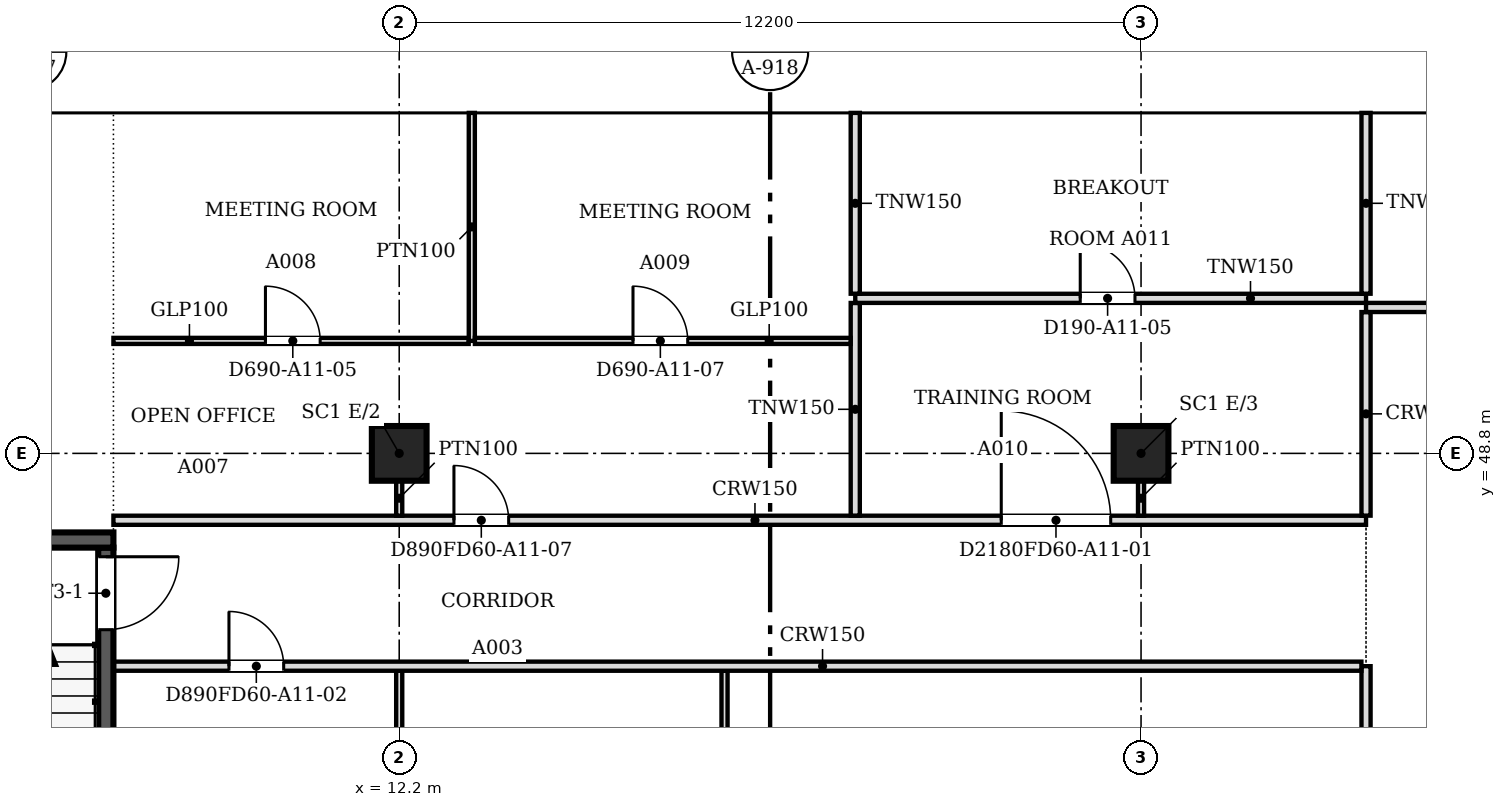
"""IFC4 building model, lengths in metres.
Left out: names, types, materials, properties, quantities, classifications, styles, units other than length and angle.
Written with IfcOpenShell. Run it as: python <this file> out.ifc"""

import sys

from ifc_helpers import new_model, si_unit, direction, frame, frame_2d, origin, origin_2d, place, context, subcontext, project, spatial, polyline, rectangle, outline, extrude, faceted_brep, source, transform, mapped, element, fill, save


model = new_model("IFC4")
c1 = context("Model", 3, precision=1e-05, world=origin(), true_north=direction((0.0, 1.0)))
c2 = subcontext(c1, "Body", "Model", "MODEL_VIEW")
j1 = project(units=[si_unit("LENGTHUNIT", "METRE"), si_unit("PLANEANGLEUNIT", "RADIAN")], contexts=[c1])
p1 = place(None, origin())
s1 = spatial("IfcSite", under=j1, at=p1, CompositionType="ELEMENT")
p2 = place(p1, origin())
s2 = spatial("IfcBuilding", under=s1, at=p2, CompositionType="ELEMENT")
p3 = place(p2, frame((0.0, 0.0, 131.6)))
s3 = spatial("IfcBuildingStorey", under=s2, at=p3, CompositionType="ELEMENT", Elevation=131.6)
for number, where, z_axis, x_axis in (
    (1, (12.2, 48.8, 0.0), (0.0, 0.0, 1.0), (1.0, 0.0, 0.0)),
    (2, (24.4, 48.8, 0.0), (0.0, 0.0, 1.0), (1.0, 0.0, 0.0)),
):
    element("IfcColumn", number, at=place(p3, frame(where, z_axis=z_axis, x_axis=x_axis)), inside=s3, PredefinedType="COLUMN", context=c2, shape_type="SweptSolid", body=[
        extrude(rectangle(XDim=0.9, YDim=0.9, at=origin_2d()), origin(), (0.0, 0.0, 1.0), 3.6),
    ])
m1 = source(origin(), c2, "Body", "SweptSolid", [
    extrude(outline(polyline([(3.05, 0.0), (6.1, 3.8), (3.05, 7.6), (0.0, 3.8), (3.05, 0.0)])), frame((0.0, 0.25, 0.0), z_axis=(0.0, -1.0, 0.0), x_axis=(1.0, 0.0, 0.0)), (0.0, 0.0, 1.0), 0.5),
])
p4 = place(p3, frame((30.5, 54.65, -3.8), z_axis=(0.0, 0.0, 1.0), x_axis=(-1.0, 0.0, 0.0)))
e3 = element("IfcWall", 3, at=p4, inside=s3, PredefinedType="SOLIDWALL", context=c2, shape_type="MappedRepresentation", body=[
    mapped(m1, transform((0.0, 0.0, 0.0), scale=1.0)),
])
m2 = source(origin(), c2, "Body", "SweptSolid", [
    extrude(outline(polyline([(3.05, 0.399), (5.78, 3.8), (3.05, 7.2), (0.321, 3.8), (3.05, 0.399)])), frame((0.0, 0.26, 0.0), z_axis=(0.0, -1.0, 0.0), x_axis=(1.0, 0.0, 0.0)), (0.0, 0.0, 1.0), 0.52),
])
p5 = place(p4, origin())
e4 = element("IfcOpeningElement", 4, at=p5, cuts=e3, PredefinedType="OPENING", context=c2, shape_type="MappedRepresentation", body=[
    mapped(m2, transform((0.0, 0.0, 0.0), scale=1.0)),
])
m3 = source(origin(), c2, "Body", "Brep", [
    faceted_brep([(3.05, -0.25, 0.0), (6.1, -0.25, 3.8), (6.1, -0.25, 3.8), (3.05, -0.25, 7.6), (0.0, -0.25, 3.8), (0.0, 0.25, 3.8), (3.05, 0.25, 7.6), (6.1, 0.25, 3.8), (6.1, 0.25, 3.8), (3.05, 0.25, 0.0)], [[[0, 1, 2, 3, 4]], [[5, 6, 7, 8, 9]], [[9, 8, 1, 0]], [[7, 6, 3, 2]], [[6, 5, 4, 3]], [[5, 9, 0, 4]], [[1, 8, 7, 2]]]),
])
p6 = place(p3, frame((24.4, 54.65, -3.8), z_axis=(0.0, 0.0, 1.0), x_axis=(-1.0, 0.0, 0.0)))
e5 = element("IfcWall", 5, at=p6, inside=s3, PredefinedType="SOLIDWALL", context=c2, shape_type="MappedRepresentation", body=[
    mapped(m3, transform((0.0, 0.0, 0.0), scale=1.0)),
])
p7 = place(p6, origin())
e6 = element("IfcOpeningElement", 6, at=p7, cuts=e5, PredefinedType="OPENING", context=c2, shape_type="MappedRepresentation", body=[
    mapped(m2, transform((0.0, 0.0, 0.0), scale=1.0)),
])
p8 = place(p3, frame((18.3, 54.65, -3.8), z_axis=(0.0, 0.0, 1.0), x_axis=(-1.0, 0.0, 0.0)))
e7 = element("IfcWall", 7, at=p8, inside=s3, PredefinedType="SOLIDWALL", context=c2, shape_type="MappedRepresentation", body=[
    mapped(m1, transform((0.0, 0.0, 0.0), scale=1.0)),
])
p9 = place(p8, origin())
e8 = element("IfcOpeningElement", 8, at=p9, cuts=e7, PredefinedType="OPENING", context=c2, shape_type="MappedRepresentation", body=[
    mapped(m2, transform((0.0, 0.0, 0.0), scale=1.0)),
])
m4 = source(origin(), c2, "Body", "Brep", [
    faceted_brep([(3.05, -0.25, 0.0), (6.053, -0.25, 3.8), (3.05, -0.25, 7.6), (0.0, -0.25, 3.8), (0.0, 0.25, 3.8), (3.05, 0.25, 7.6), (6.007, 0.25, 3.859), (6.007, 0.25, 3.741), (3.05, 0.25, 0.0), (6.053, 0.0, 3.8)], [[[0, 1, 2, 3]], [[4, 5, 6, 7, 8]], [[8, 7, 9, 1, 0]], [[6, 5, 2, 1, 9]], [[5, 4, 3, 2]], [[4, 8, 0, 3]], [[7, 6, 9]]]),
])
p10 = place(p3, frame((12.2, 54.65, -3.8), z_axis=(0.0, 0.0, 1.0), x_axis=(-1.0, 0.0, 0.0)))
e9 = element("IfcWall", 9, at=p10, inside=s3, PredefinedType="SOLIDWALL", context=c2, shape_type="MappedRepresentation", body=[
    mapped(m4, transform((0.0, 0.0, 0.0), scale=1.0)),
])
m5 = source(origin(), c2, "Body", "SweptSolid", [
    extrude(outline(polyline([(3.049, 0.401), (5.735, 3.8), (3.049, 7.199), (0.321, 3.8), (3.049, 0.401)])), frame((0.0, 0.26, 0.0), z_axis=(0.0, -1.0, 0.0), x_axis=(1.0, 0.0, 0.0)), (0.0, 0.0, 1.0), 0.52),
])
p11 = place(p10, origin())
e10 = element("IfcOpeningElement", 10, at=p11, cuts=e9, PredefinedType="OPENING", context=c2, shape_type="MappedRepresentation", body=[
    mapped(m5, transform((0.0, 0.0, 0.0), scale=1.0)),
])
p12 = place(p2, frame((0.0, 0.0, 135.4)))
s4 = spatial("IfcBuildingStorey", under=s2, at=p12, CompositionType="ELEMENT", Elevation=135.4)
m6 = source(origin(), c2, "Body", "SweptSolid", [
    extrude(outline(polyline([(3.05, 0.0), (6.1, 3.8), (3.05, 7.6), (0.0, 3.8), (3.05, 0.0)])), frame((0.0, 0.25, 0.0), z_axis=(0.0, -1.0, 0.0), x_axis=(1.0, 0.0, 0.0)), (0.0, 0.0, 1.0), 0.5),
])
p13 = place(p12, frame((33.55, 54.65, -3.8), z_axis=(0.0, 0.0, 1.0), x_axis=(-1.0, 0.0, 0.0)))
e11 = element("IfcWall", 11, at=p13, inside=s4, PredefinedType="SOLIDWALL", context=c2, shape_type="MappedRepresentation", body=[
    mapped(m6, transform((0.0, 0.0, 0.0), scale=1.0)),
])
m7 = source(origin(), c2, "Body", "SweptSolid", [
    extrude(outline(polyline([(3.05, 0.399), (5.78, 3.8), (3.05, 7.2), (0.321, 3.8), (3.05, 0.399)])), frame((0.0, 0.26, 0.0), z_axis=(0.0, -1.0, 0.0), x_axis=(1.0, 0.0, 0.0)), (0.0, 0.0, 1.0), 0.52),
])
p14 = place(p13, origin())
e12 = element("IfcOpeningElement", 12, at=p14, cuts=e11, PredefinedType="OPENING", context=c2, shape_type="MappedRepresentation", body=[
    mapped(m7, transform((0.0, 0.0, 0.0), scale=1.0)),
])
m8 = source(origin(), c2, "Body", "Brep", [
    faceted_brep([(3.05, -0.25, 0.0), (6.1, -0.25, 3.8), (6.1, -0.25, 3.8), (3.05, -0.25, 7.6), (0.0, -0.25, 3.8), (0.0, 0.25, 3.8), (3.05, 0.25, 7.6), (6.1, 0.25, 3.8), (6.1, 0.25, 3.8), (3.05, 0.25, 0.0)], [[[0, 1, 2, 3, 4]], [[5, 6, 7, 8, 9]], [[9, 8, 1, 0]], [[7, 6, 3, 2]], [[6, 5, 4, 3]], [[5, 9, 0, 4]], [[1, 8, 7, 2]]]),
])
p15 = place(p12, frame((27.45, 54.65, -3.8), z_axis=(0.0, 0.0, 1.0), x_axis=(-1.0, 0.0, 0.0)))
e13 = element("IfcWall", 13, at=p15, inside=s4, PredefinedType="SOLIDWALL", context=c2, shape_type="MappedRepresentation", body=[
    mapped(m8, transform((0.0, 0.0, 0.0), scale=1.0)),
])
p16 = place(p15, origin())
e14 = element("IfcOpeningElement", 14, at=p16, cuts=e13, PredefinedType="OPENING", context=c2, shape_type="MappedRepresentation", body=[
    mapped(m7, transform((0.0, 0.0, 0.0), scale=1.0)),
])
p17 = place(p12, frame((21.35, 54.65, -3.8), z_axis=(0.0, 0.0, 1.0), x_axis=(-1.0, 0.0, 0.0)))
e15 = element("IfcWall", 15, at=p17, inside=s4, PredefinedType="SOLIDWALL", context=c2, shape_type="MappedRepresentation", body=[
    mapped(m6, transform((0.0, 0.0, 0.0), scale=1.0)),
])
p18 = place(p17, origin())
e16 = element("IfcOpeningElement", 16, at=p18, cuts=e15, PredefinedType="OPENING", context=c2, shape_type="MappedRepresentation", body=[
    mapped(m7, transform((0.0, 0.0, 0.0), scale=1.0)),
])
p19 = place(p12, frame((15.25, 54.65, -3.8), z_axis=(0.0, 0.0, 1.0), x_axis=(-1.0, 0.0, 0.0)))
e17 = element("IfcWall", 17, at=p19, inside=s4, PredefinedType="SOLIDWALL", context=c2, shape_type="MappedRepresentation", body=[
    mapped(m6, transform((0.0, 0.0, 0.0), scale=1.0)),
])
p20 = place(p19, origin())
e18 = element("IfcOpeningElement", 18, at=p20, cuts=e17, PredefinedType="OPENING", context=c2, shape_type="MappedRepresentation", body=[
    mapped(m7, transform((0.0, 0.0, 0.0), scale=1.0)),
])
m9 = source(origin(), c2, "Body", "Brep", [
    faceted_brep([(3.003, -0.25, 0.0), (3.05, -0.25, 0.06), (3.05, -0.25, 7.54), (3.003, -0.25, 7.6), (0.0, -0.25, 3.8), (0.0, 0.25, 3.8), (2.957, 0.25, 7.541), (2.957, 0.25, 0.059), (3.003, 0.0, 0.0), (3.003, 0.0, 7.6)], [[[0, 1, 2, 3, 4]], [[5, 6, 7]], [[1, 0, 8]], [[9, 3, 2]], [[6, 5, 4, 3, 9]], [[5, 7, 8, 0, 4]], [[1, 8, 7, 6, 9, 2]]]),
])
p21 = place(p12, frame((9.15, 54.65, -3.8), z_axis=(0.0, 0.0, 1.0), x_axis=(-1.0, 0.0, 0.0)))
e19 = element("IfcWall", 19, at=p21, inside=s4, PredefinedType="SOLIDWALL", context=c2, shape_type="MappedRepresentation", body=[
    mapped(m9, transform((0.0, 0.0, 0.0), scale=1.0)),
])
m10 = source(origin(), c2, "Body", "SweptSolid", [
    extrude(outline(polyline([(2.803, 6.944), (0.319, 3.8), (2.803, 0.656), (2.803, 6.944)])), frame((0.0, 0.26, 0.0), z_axis=(0.0, -1.0, 0.0), x_axis=(1.0, 0.0, 0.0)), (0.0, 0.0, 1.0), 0.52),
])
p22 = place(p21, origin())
e20 = element("IfcOpeningElement", 20, at=p22, cuts=e19, PredefinedType="OPENING", context=c2, shape_type="MappedRepresentation", body=[
    mapped(m10, transform((0.0, 0.0, 0.0), scale=1.0)),
])
p23 = place(p3, frame((3.6, 47.375, 0.0), z_axis=(0.0, 0.0, 1.0), x_axis=(1.0, 0.0, 0.0)))
e21 = element("IfcWall", 21, at=p23, inside=s3, PredefinedType="SOLIDWALL", context=c2, shape_type="SweptSolid", body=[
    extrude(rectangle(XDim=3.9, YDim=0.25, at=frame_2d((1.95, 0.0))), origin(), (0.0, 0.0, 1.0), 3.8),
])
p24 = place(p3, frame((7.375, 47.25, 0.0), z_axis=(0.0, 0.0, 1.0), x_axis=(0.0, -1.0, 0.0)))
e22 = element("IfcWall", 22, at=p24, inside=s3, PredefinedType="SOLIDWALL", context=c2, shape_type="SweptSolid", body=[
    extrude(rectangle(XDim=8.0, YDim=0.25, at=frame_2d((4.0, 0.0))), origin(), (0.0, 0.0, 1.0), 3.8),
])
m11 = source(origin(), c2, "Body", "SweptSolid", [
    extrude(rectangle(XDim=1.2, YDim=2.1, at=frame_2d((0.6, 1.05))), frame((0.0, 0.135, 0.0), z_axis=(0.0, -1.0, 0.0), x_axis=(1.0, 0.0, 0.0)), (0.0, 0.0, 1.0), 0.27),
])
p25 = place(p24, frame((0.15, 0.0, 0.0)))
e23 = element("IfcOpeningElement", 23, at=p25, cuts=e22, PredefinedType="OPENING", context=c2, shape_type="MappedRepresentation", body=[
    mapped(m11, transform((0.0, 0.0, 0.0), scale=1.0)),
])
p26 = place(p3, frame((28.1, 18.8, 0.0), z_axis=(0.0, 0.0, 1.0), x_axis=(0.0, 1.0, 0.0)))
e24 = element("IfcWall", 24, at=p26, inside=s3, PredefinedType="PARTITIONING", context=c2, shape_type="SweptSolid", body=[
    extrude(rectangle(XDim=26.5, YDim=0.15, at=frame_2d((13.25, 0.0))), origin(), (0.0, 0.0, 1.0), 3.067),
])
m12 = source(origin(), c2, "Body", "SweptSolid", [
    extrude(rectangle(XDim=0.9, YDim=2.1, at=frame_2d((0.45, 1.05))), frame((0.0, 0.085, 0.0), z_axis=(0.0, -1.0, 0.0), x_axis=(1.0, 0.0, 0.0)), (0.0, 0.0, 1.0), 0.17),
])
p27 = place(p26, frame((1.1, 0.0, 0.0)))
e25 = element("IfcOpeningElement", 25, at=p27, cuts=e24, PredefinedType="OPENING", context=c2, shape_type="MappedRepresentation", body=[
    mapped(m12, transform((0.0, 0.0, 0.0), scale=1.0)),
])
p28 = place(p26, frame((9.7, 0.0, 0.0)))
e26 = element("IfcOpeningElement", 26, at=p28, cuts=e24, PredefinedType="OPENING", context=c2, shape_type="MappedRepresentation", body=[
    mapped(m12, transform((0.0, 0.0, 0.0), scale=1.0)),
])
p29 = place(p26, frame((20.15, 0.0, 0.0)))
e27 = element("IfcOpeningElement", 27, at=p29, cuts=e24, PredefinedType="OPENING", context=c2, shape_type="MappedRepresentation", body=[
    mapped(m12, transform((0.0, 0.0, 0.0), scale=1.0)),
])
p30 = place(p3, frame((17.55, 39.277, 0.0), z_axis=(0.0, 0.0, 1.0), x_axis=(0.0, 1.0, 0.0)))
e28 = element("IfcWall", 28, at=p30, inside=s3, PredefinedType="PARTITIONING", context=c2, shape_type="SweptSolid", body=[
    extrude(rectangle(XDim=5.947, YDim=0.1, at=frame_2d((2.973, 0.0))), origin(), (0.0, 0.0, 1.0), 3.067),
])
m13 = source(origin(), c2, "Body", "SweptSolid", [
    extrude(rectangle(XDim=0.9, YDim=2.1, at=frame_2d((0.45, 1.05))), frame((0.0, 0.06, 0.0), z_axis=(0.0, -1.0, 0.0), x_axis=(1.0, 0.0, 0.0)), (0.0, 0.0, 1.0), 0.12),
])
p31 = place(p30, frame((2.5, 0.0, 0.0)))
e29 = element("IfcOpeningElement", 29, at=p31, cuts=e28, PredefinedType="OPENING", context=c2, shape_type="MappedRepresentation", body=[
    mapped(m13, transform((0.0, 0.0, 0.0), scale=1.0)),
])
p32 = place(p3, frame((12.2, 40.156, 0.0), z_axis=(0.0, 0.0, 1.0), x_axis=(0.0, 1.0, 0.0)))
e30 = element("IfcWall", 30, at=p32, inside=s3, PredefinedType="PARTITIONING", context=c2, shape_type="SweptSolid", body=[
    extrude(rectangle(XDim=5.068, YDim=0.1, at=frame_2d((2.534, 0.0))), origin(), (0.0, 0.0, 1.0), 3.067),
])
p33 = place(p3, frame((28.024, 45.3, 0.0), z_axis=(0.0, 0.0, 1.0), x_axis=(-1.0, 0.0, 0.0)))
e31 = element("IfcWall", 31, at=p33, inside=s3, PredefinedType="PARTITIONING", context=c2, shape_type="SweptSolid", body=[
    extrude(rectangle(XDim=20.524, YDim=0.15, at=frame_2d((10.262, 0.0))), origin(), (0.0, 0.0, 1.0), 3.067),
])
p34 = place(p33, frame((17.724, 0.0, 0.0)))
e32 = element("IfcOpeningElement", 32, at=p34, cuts=e31, PredefinedType="OPENING", context=c2, shape_type="MappedRepresentation", body=[
    mapped(m12, transform((0.0, 0.0, 0.0), scale=1.0)),
])
p35 = place(p3, frame((7.5, 47.7, 0.0), z_axis=(0.0, 0.0, 1.0), x_axis=(1.0, 0.0, 0.0)))
e33 = element("IfcWall", 33, at=p35, inside=s3, PredefinedType="PARTITIONING", context=c2, shape_type="SweptSolid", body=[
    extrude(rectangle(XDim=20.6, YDim=0.15, at=frame_2d((10.3, 0.0))), origin(), (0.0, 0.0, 1.0), 3.067),
])
m14 = source(origin(), c2, "Body", "SweptSolid", [
    extrude(rectangle(XDim=1.8, YDim=2.1, at=frame_2d((0.9, 1.05))), frame((0.0, 0.085, 0.0), z_axis=(0.0, -1.0, 0.0), x_axis=(1.0, 0.0, 0.0)), (0.0, 0.0, 1.0), 0.17),
])
p36 = place(p35, frame((14.601, 0.0, 0.0)))
e34 = element("IfcOpeningElement", 34, at=p36, cuts=e33, PredefinedType="OPENING", context=c2, shape_type="MappedRepresentation", body=[
    mapped(m14, transform((0.0, 0.0, 0.0), scale=1.0)),
])
p37 = place(p35, frame((5.6, 0.0, 0.0)))
e35 = element("IfcOpeningElement", 35, at=p37, cuts=e33, PredefinedType="OPENING", context=c2, shape_type="MappedRepresentation", body=[
    mapped(m12, transform((0.0, 0.0, 0.0), scale=1.0)),
])
p38 = place(p3, frame((19.7, 47.776, 0.0), z_axis=(0.0, 0.0, 1.0), x_axis=(0.0, 1.0, 0.0)))
e36 = element("IfcWall", 36, at=p38, inside=s3, PredefinedType="PARTITIONING", context=c2, shape_type="SweptSolid", body=[
    extrude(rectangle(XDim=3.498, YDim=0.15, at=frame_2d((1.749, 0.0))), origin(), (0.0, 0.0, 1.0), 3.067),
])
p39 = place(p3, frame((28.1, 47.776, 0.0), z_axis=(0.0, 0.0, 1.0), x_axis=(0.0, 1.0, 0.0)))
e37 = element("IfcWall", 37, at=p39, inside=s3, PredefinedType="PARTITIONING", context=c2, shape_type="SweptSolid", body=[
    extrude(rectangle(XDim=3.348, YDim=0.15, at=frame_2d((1.674, 0.0))), origin(), (0.0, 0.0, 1.0), 3.067),
])
for number, where, z_axis, x_axis in (
    (38, (12.2, 48.35, 0.0), (0.0, 0.0, 1.0), (0.0, -1.0, 0.0)),
    (39, (24.4, 48.35, 0.0), (0.0, 0.0, 1.0), (0.0, -1.0, 0.0)),
):
    element("IfcWall", number, at=place(p3, frame(where, z_axis=z_axis, x_axis=x_axis)), inside=s3, PredefinedType="PARTITIONING", context=c2, shape_type="SweptSolid", body=[
        extrude(rectangle(XDim=0.575, YDim=0.1, at=frame_2d((0.288, 0.0))), origin(), (0.0, 0.0, 1.0), 3.067),
    ])
p40 = place(p3, frame((7.5, 50.65, 0.0), z_axis=(0.0, 0.0, 1.0), x_axis=(1.0, 0.0, 0.0)))
e40 = element("IfcWall", 40, at=p40, inside=s3, PredefinedType="PARTITIONING", context=c2, shape_type="SweptSolid", body=[
    extrude(rectangle(XDim=5.843, YDim=0.1, at=frame_2d((2.921, 0.0))), origin(), (0.0, 0.0, 1.0), 3.067),
])
p41 = place(p40, frame((2.5, 0.0, 0.0)))
e41 = element("IfcOpeningElement", 41, at=p41, cuts=e40, PredefinedType="OPENING", context=c2, shape_type="MappedRepresentation", body=[
    mapped(m13, transform((0.0, 0.0, 0.0), scale=1.0)),
])
p42 = place(p3, frame((13.394, 50.65, 0.0), z_axis=(0.0, 0.0, 1.0), x_axis=(0.0, 1.0, 0.0)))
e42 = element("IfcWall", 42, at=p42, inside=s3, PredefinedType="PARTITIONING", context=c2, shape_type="SweptSolid", body=[
    extrude(rectangle(XDim=3.75, YDim=0.1, at=frame_2d((1.875, 0.0))), origin(), (0.0, 0.0, 1.0), 3.067),
])
p43 = place(p3, frame((13.445, 50.65, 0.0), z_axis=(0.0, 0.0, 1.0), x_axis=(1.0, 0.0, 0.0)))
e43 = element("IfcWall", 43, at=p43, inside=s3, PredefinedType="PARTITIONING", context=c2, shape_type="SweptSolid", body=[
    extrude(rectangle(XDim=6.179, YDim=0.1, at=frame_2d((3.09, 0.0))), origin(), (0.0, 0.0, 1.0), 3.067),
])
p44 = place(p43, frame((2.6, 0.0, 0.0)))
e44 = element("IfcOpeningElement", 44, at=p44, cuts=e43, PredefinedType="OPENING", context=c2, shape_type="MappedRepresentation", body=[
    mapped(m13, transform((0.0, 0.0, 0.0), scale=1.0)),
])
p45 = place(p3, frame((28.1, 51.2, 0.0), z_axis=(0.0, 0.0, 1.0), x_axis=(1.0, 0.0, 0.0)))
e45 = element("IfcWall", 45, at=p45, inside=s3, PredefinedType="PARTITIONING", context=c2, shape_type="SweptSolid", body=[
    extrude(rectangle(XDim=31.438, YDim=0.15, at=frame_2d((15.719, 0.0))), origin(), (0.0, 0.0, 1.0), 3.067),
])
p46 = place(p45, frame((7.0, 0.0, 0.0)))
e46 = element("IfcOpeningElement", 46, at=p46, cuts=e45, PredefinedType="OPENING", context=c2, shape_type="MappedRepresentation", body=[
    mapped(m12, transform((0.0, 0.0, 0.0), scale=1.0)),
])
p47 = place(p45, frame((22.8, 0.0, 0.0)))
e47 = element("IfcOpeningElement", 47, at=p47, cuts=e45, PredefinedType="OPENING", context=c2, shape_type="MappedRepresentation", body=[
    mapped(m12, transform((0.0, 0.0, 0.0), scale=1.0)),
])
p48 = place(p3, frame((19.7, 51.35, 0.0), z_axis=(0.0, 0.0, 1.0), x_axis=(1.0, 0.0, 0.0)))
e48 = element("IfcWall", 48, at=p48, inside=s3, PredefinedType="PARTITIONING", context=c2, shape_type="SweptSolid", body=[
    extrude(rectangle(XDim=8.4, YDim=0.15, at=frame_2d((4.2, 0.0))), origin(), (0.0, 0.0, 1.0), 3.067),
])
p49 = place(p48, frame((3.7, 0.0, 0.0)))
e49 = element("IfcOpeningElement", 49, at=p49, cuts=e48, PredefinedType="OPENING", context=c2, shape_type="MappedRepresentation", body=[
    mapped(m12, transform((0.0, 0.0, 0.0), scale=1.0)),
])
for number, where, z_axis, x_axis in (
    (50, (19.7, 51.426, 0.0), (0.0, 0.0, 1.0), (0.0, 1.0, 0.0)),
    (51, (28.1, 51.426, 0.0), (0.0, 0.0, 1.0), (0.0, 1.0, 0.0)),
):
    element("IfcWall", number, at=place(p3, frame(where, z_axis=z_axis, x_axis=x_axis)), inside=s3, PredefinedType="PARTITIONING", context=c2, shape_type="SweptSolid", body=[
        extrude(rectangle(XDim=2.974, YDim=0.15, at=frame_2d((1.487, 0.0))), origin(), (0.0, 0.0, 1.0), 3.067),
    ])
m15 = source(origin(), c2, "Body", "SweptSolid", [
    extrude(rectangle(XDim=1.2, YDim=2.1, at=frame_2d((0.6, 1.05))), frame((0.0, 0.025, 0.0), z_axis=(0.0, -1.0, 0.0), x_axis=(1.0, 0.0, 0.0)), (0.0, 0.0, 1.0), 0.05),
])
p50 = place(p25, origin())
e52 = element("IfcDoor", 52, at=p50, inside=s3, OperationType="SINGLE_SWING_LEFT", PredefinedType="DOOR", context=c2, shape_type="MappedRepresentation", body=[
    mapped(m15, transform((0.0, 0.0, 0.0), scale=1.0)),
])
fill(e23, e52)
m16 = source(origin(), c2, "Body", "SweptSolid", [
    extrude(rectangle(XDim=0.9, YDim=2.1, at=frame_2d((0.45, 1.05))), frame((0.0, 0.025, 0.0), z_axis=(0.0, -1.0, 0.0), x_axis=(1.0, 0.0, 0.0)), (0.0, 0.0, 1.0), 0.05),
])
p51 = place(p34, origin())
e53 = element("IfcDoor", 53, at=p51, inside=s3, OperationType="SINGLE_SWING_RIGHT", PredefinedType="DOOR", context=c2, shape_type="MappedRepresentation", body=[
    mapped(m16, transform((0.0, 0.0, 0.0), scale=1.0)),
])
fill(e32, e53)
p52 = place(p41, origin())
e54 = element("IfcDoor", 54, at=p52, inside=s3, OperationType="SINGLE_SWING_LEFT", PredefinedType="DOOR", context=c2, shape_type="MappedRepresentation", body=[
    mapped(m16, transform((0.0, 0.0, 0.0), scale=1.0)),
])
fill(e41, e54)
p53 = place(p44, origin())
e55 = element("IfcDoor", 55, at=p53, inside=s3, OperationType="SINGLE_SWING_LEFT", PredefinedType="DOOR", context=c2, shape_type="MappedRepresentation", body=[
    mapped(m16, transform((0.0, 0.0, 0.0), scale=1.0)),
])
fill(e44, e55)
m17 = source(origin(), c2, "Body", "SweptSolid", [
    extrude(rectangle(XDim=1.8, YDim=2.1, at=frame_2d((0.9, 1.05))), frame((0.0, 0.025, 0.0), z_axis=(0.0, -1.0, 0.0), x_axis=(1.0, 0.0, 0.0)), (0.0, 0.0, 1.0), 0.05),
])
p54 = place(p36, origin())
e56 = element("IfcDoor", 56, at=p54, inside=s3, OperationType="DOUBLE_DOOR_SINGLE_SWING", PredefinedType="DOOR", context=c2, shape_type="MappedRepresentation", body=[
    mapped(m17, transform((0.0, 0.0, 0.0), scale=1.0)),
])
fill(e34, e56)
p55 = place(p49, origin())
e57 = element("IfcDoor", 57, at=p55, inside=s3, OperationType="SINGLE_SWING_LEFT", PredefinedType="DOOR", context=c2, shape_type="MappedRepresentation", body=[
    mapped(m16, transform((0.0, 0.0, 0.0), scale=1.0)),
])
fill(e49, e57)
p56 = place(p37, origin())
e58 = element("IfcDoor", 58, at=p56, inside=s3, OperationType="SINGLE_SWING_LEFT", PredefinedType="DOOR", context=c2, shape_type="MappedRepresentation", body=[
    mapped(m16, transform((0.0, 0.0, 0.0), scale=1.0)),
])
fill(e35, e58)
save(model, sys.argv[1])
